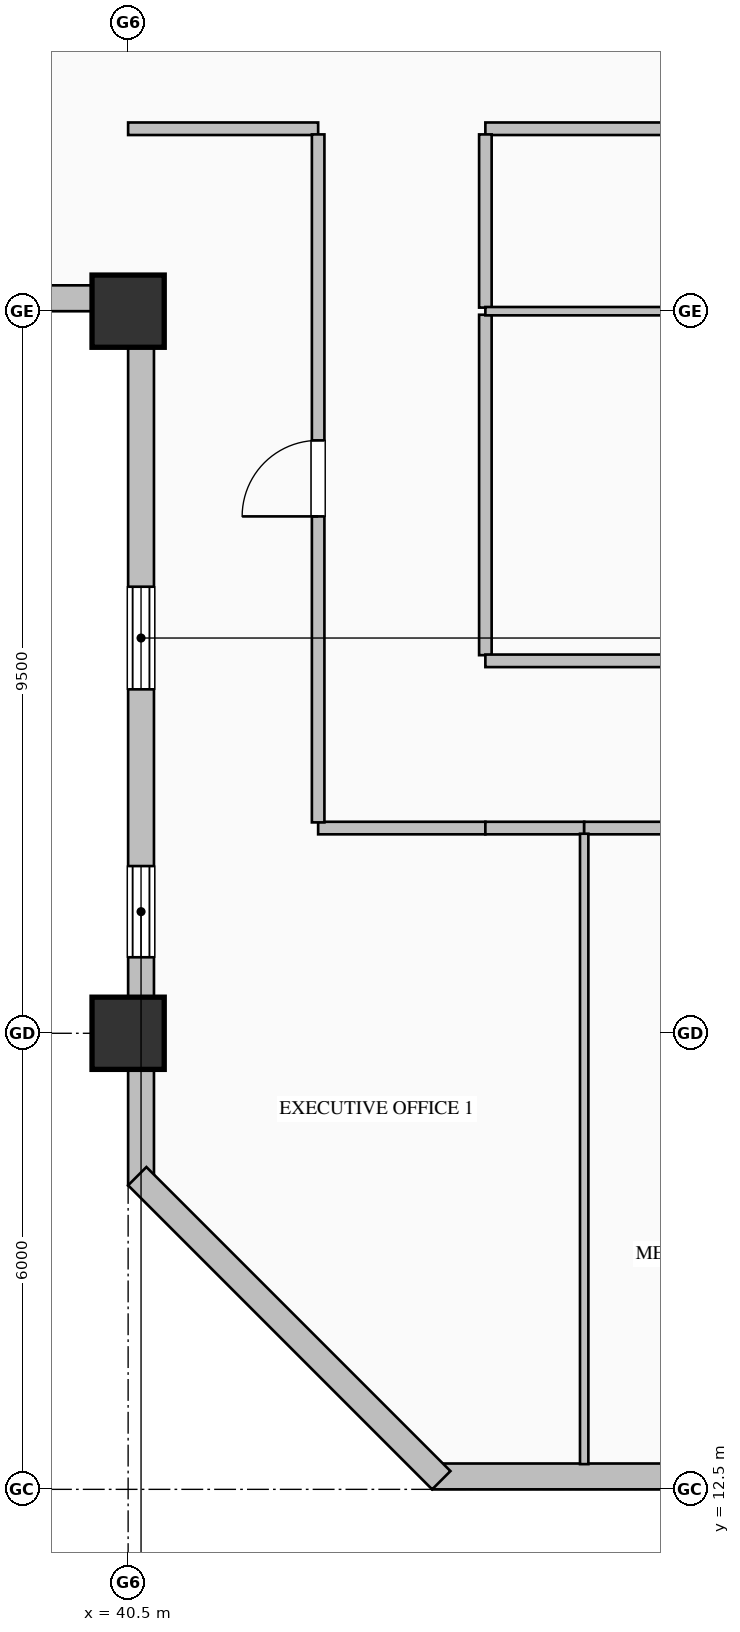
"""IFC4 building model, lengths in metres.
Left out: names, types, materials, properties, quantities, classifications, styles, units other than length and angle.
Written with IfcOpenShell. Run it as: python <this file> out.ifc"""

import sys

from ifc_helpers import new_model, si_unit, direction, frame, frame_2d, origin, origin_2d, place, context, subcontext, project, spatial, rectangle, hollow_rectangle, extrude, element, fill, save


model = new_model("IFC4")
c1 = context("Model", 3, precision=1e-05, world=origin(), true_north=direction((0.0, 1.0)))
c2 = subcontext(c1, "Body", "Model", "MODEL_VIEW")
j1 = project(units=[si_unit("LENGTHUNIT", "METRE"), si_unit("PLANEANGLEUNIT", "RADIAN")], contexts=[c1])
p1 = place(None, origin())
s1 = spatial("IfcSite", under=j1, at=p1, CompositionType="ELEMENT")
p2 = place(p1, origin())
s2 = spatial("IfcBuilding", under=s1, at=p2, CompositionType="ELEMENT")
p3 = place(p2, frame((0.0, 0.0, 213.8)))
s3 = spatial("IfcBuildingStorey", under=s2, at=p3, CompositionType="ELEMENT", Elevation=213.8)
for number, where, z_axis, x_axis in (
    (1, (40.5, 18.5, 0.0), (0.0, 0.0, 1.0), (1.0, 0.0, 0.0)),
    (2, (40.5, 28.0, 0.0), (0.0, 0.0, 1.0), (1.0, 0.0, 0.0)),
):
    element("IfcColumn", number, at=place(p3, frame(where, z_axis=z_axis, x_axis=x_axis)), inside=s3, PredefinedType="COLUMN", context=c2, shape_type="SweptSolid", body=[
        extrude(hollow_rectangle(XDim=0.95, YDim=0.95, WallThickness=0.036, at=origin_2d()), origin(), (0.0, 0.0, 1.0), 4.0),
    ])
p4 = place(p3, frame((40.67, 16.5, 0.0), z_axis=(0.0, 0.0, 1.0), x_axis=(0.0, 1.0, 0.0)))
e3 = element("IfcWall", 3, at=p4, inside=s3, PredefinedType="SOLIDWALL", context=c2, shape_type="SweptSolid", body=[
    extrude(rectangle(XDim=11.84, YDim=0.34, at=frame_2d((5.92, 0.0))), origin(), (0.0, 0.0, 1.0), 3.187),
])
p5 = place(p4, frame((3.0, 0.0, 0.9)))
e4 = element("IfcOpeningElement", 4, at=p5, cuts=e3, PredefinedType="OPENING", context=c2, shape_type="SweptSolid", body=[
    extrude(rectangle(XDim=1.2, YDim=1.85, at=frame_2d((0.6, 0.925))), frame((0.0, 0.18, 0.0), z_axis=(0.0, -1.0, 0.0), x_axis=(1.0, 0.0, 0.0)), (0.0, 0.0, 1.0), 0.36),
])
p6 = place(p4, frame((6.525, 0.0, 0.9)))
e5 = element("IfcOpeningElement", 5, at=p6, cuts=e3, PredefinedType="OPENING", context=c2, shape_type="SweptSolid", body=[
    extrude(rectangle(XDim=1.35, YDim=1.85, at=frame_2d((0.675, 0.925))), frame((0.0, 0.18, 0.0), z_axis=(0.0, -1.0, 0.0), x_axis=(1.0, 0.0, 0.0)), (0.0, 0.0, 1.0), 0.36),
])
p7 = place(p3, frame((40.52, 28.17, 0.0), z_axis=(0.0, 0.0, 1.0), x_axis=(-1.0, 0.0, 0.0)))
e6 = element("IfcWall", 6, at=p7, inside=s3, PredefinedType="SOLIDWALL", context=c2, shape_type="SweptSolid", body=[
    extrude(rectangle(XDim=27.52, YDim=0.34, at=frame_2d((13.76, 0.0))), origin(), (0.0, 0.0, 1.0), 3.187),
])
p8 = place(p7, frame((10.2, 0.0, 0.9)))
e7 = element("IfcOpeningElement", 7, at=p8, cuts=e6, PredefinedType="OPENING", context=c2, shape_type="SweptSolid", body=[
    extrude(rectangle(XDim=1.2, YDim=1.85, at=frame_2d((0.6, 0.925))), frame((0.0, 0.18, 0.0), z_axis=(0.0, -1.0, 0.0), x_axis=(1.0, 0.0, 0.0)), (0.0, 0.0, 1.0), 0.36),
])
p9 = place(p7, frame((13.725, 0.0, 0.9)))
e8 = element("IfcOpeningElement", 8, at=p9, cuts=e6, PredefinedType="OPENING", context=c2, shape_type="SweptSolid", body=[
    extrude(rectangle(XDim=1.35, YDim=1.85, at=frame_2d((0.675, 0.925))), frame((0.0, 0.18, 0.0), z_axis=(0.0, -1.0, 0.0), x_axis=(1.0, 0.0, 0.0)), (0.0, 0.0, 1.0), 0.36),
])
p10 = place(p7, frame((17.4, 0.0, 0.7)))
e9 = element("IfcOpeningElement", 9, at=p10, cuts=e6, PredefinedType="OPENING", context=c2, shape_type="SweptSolid", body=[
    extrude(rectangle(XDim=1.2, YDim=1.85, at=frame_2d((0.6, 0.925))), frame((0.0, 0.18, 0.0), z_axis=(0.0, -1.0, 0.0), x_axis=(1.0, 0.0, 0.0)), (0.0, 0.0, 1.0), 0.36),
])
p11 = place(p7, frame((21.0, 0.0, 0.9)))
e10 = element("IfcOpeningElement", 10, at=p11, cuts=e6, PredefinedType="OPENING", context=c2, shape_type="SweptSolid", body=[
    extrude(rectangle(XDim=1.2, YDim=1.85, at=frame_2d((0.6, 0.925))), frame((0.0, 0.18, 0.0), z_axis=(0.0, -1.0, 0.0), x_axis=(1.0, 0.0, 0.0)), (0.0, 0.0, 1.0), 0.36),
])
p12 = place(p3, frame((60.0, 12.67, 0.0), z_axis=(0.0, 0.0, 1.0), x_axis=(-1.0, 0.0, 0.0)))
e11 = element("IfcWall", 11, at=p12, inside=s3, PredefinedType="SOLIDWALL", context=c2, shape_type="SweptSolid", body=[
    extrude(rectangle(XDim=15.5, YDim=0.34, at=frame_2d((7.75, 0.0))), origin(), (0.0, 0.0, 1.0), 3.325),
])
p13 = place(p3, frame((44.62, 12.62, 0.0), z_axis=(0.0, 0.0, 1.0), x_axis=(-0.707106781187, 0.707106781187, 0.0)))
e12 = element("IfcWall", 12, at=p13, inside=s3, PredefinedType="SOLIDWALL", context=c2, shape_type="SweptSolid", body=[
    extrude(rectangle(XDim=5.657, YDim=0.34, at=frame_2d((2.828, 0.0))), origin(), (0.0, 0.0, 1.0), 3.775),
])
p14 = place(p3, frame((56.5, 30.4, 0.0), z_axis=(0.0, 0.0, 1.0), x_axis=(-1.0, 0.0, 0.0)))
e13 = element("IfcWall", 13, at=p14, inside=s3, PredefinedType="PARTITIONING", context=c2, shape_type="SweptSolid", body=[
    extrude(rectangle(XDim=11.3, YDim=0.165, at=frame_2d((5.65, 0.0))), origin(), (0.0, 0.0, 1.0), 3.775),
])
p15 = place(p14, frame((5.1, 0.0, 0.0)))
e14 = element("IfcOpeningElement", 14, at=p15, cuts=e13, PredefinedType="OPENING", context=c2, shape_type="SweptSolid", body=[
    extrude(rectangle(XDim=1.1, YDim=2.2, at=frame_2d((0.55, 1.1))), frame((0.0, 0.093, 0.0), z_axis=(0.0, -1.0, 0.0), x_axis=(1.0, 0.0, 0.0)), (0.0, 0.0, 1.0), 0.185),
])
p16 = place(p3, frame((43.0, 30.4, 0.0), z_axis=(0.0, 0.0, 1.0), x_axis=(-1.0, 0.0, 0.0)))
e15 = element("IfcWall", 15, at=p16, inside=s3, PredefinedType="PARTITIONING", context=c2, shape_type="SweptSolid", body=[
    extrude(rectangle(XDim=2.5, YDim=0.165, at=frame_2d((1.25, 0.0))), origin(), (0.0, 0.0, 1.0), 3.775),
])
p17 = place(p3, frame((45.2, 27.953, 0.0), z_axis=(0.0, 0.0, 1.0), x_axis=(0.0, -1.0, 0.0)))
e16 = element("IfcWall", 16, at=p17, inside=s3, PredefinedType="PARTITIONING", context=c2, shape_type="SweptSolid", body=[
    extrude(rectangle(XDim=4.478, YDim=0.165, at=frame_2d((2.239, 0.0))), origin(), (0.0, 0.0, 1.0), 3.775),
])
p18 = place(p3, frame((45.2, 30.325, 0.0), z_axis=(0.0, 0.0, 1.0), x_axis=(0.0, -1.0, 0.0)))
e17 = element("IfcWall", 17, at=p18, inside=s3, PredefinedType="PARTITIONING", context=c2, shape_type="SweptSolid", body=[
    extrude(rectangle(XDim=2.278, YDim=0.165, at=frame_2d((1.139, 0.0))), origin(), (0.0, 0.0, 1.0), 3.775),
])
p19 = place(p3, frame((45.2, 21.2, 0.0), z_axis=(0.0, 0.0, 1.0), x_axis=(-1.0, 0.0, 0.0)))
e18 = element("IfcWall", 18, at=p19, inside=s3, PredefinedType="PARTITIONING", context=c2, shape_type="SweptSolid", body=[
    extrude(rectangle(XDim=2.2, YDim=0.165, at=frame_2d((1.1, 0.0))), origin(), (0.0, 0.0, 1.0), 3.775),
])
p20 = place(p3, frame((43.0, 21.274, 0.0), z_axis=(0.0, 0.0, 1.0), x_axis=(0.0, 1.0, 0.0)))
e19 = element("IfcWall", 19, at=p20, inside=s3, PredefinedType="PARTITIONING", context=c2, shape_type="SweptSolid", body=[
    extrude(rectangle(XDim=9.051, YDim=0.165, at=frame_2d((4.525, 0.0))), origin(), (0.0, 0.0, 1.0), 3.775),
])
p21 = place(p20, frame((4.025, 0.0, 0.0)))
e20 = element("IfcOpeningElement", 20, at=p21, cuts=e19, PredefinedType="OPENING", context=c2, shape_type="SweptSolid", body=[
    extrude(rectangle(XDim=1.0, YDim=2.15, at=frame_2d((0.5, 1.075))), frame((0.0, 0.093, 0.0), z_axis=(0.0, -1.0, 0.0), x_axis=(1.0, 0.0, 0.0)), (0.0, 0.0, 1.0), 0.185),
])
p22 = place(p3, frame((45.2, 23.4, 0.0), z_axis=(0.0, 0.0, 1.0), x_axis=(1.0, 0.0, 0.0)))
e21 = element("IfcWall", 21, at=p22, inside=s3, PredefinedType="PARTITIONING", context=c2, shape_type="SweptSolid", body=[
    extrude(rectangle(XDim=12.8, YDim=0.165, at=frame_2d((6.4, 0.0))), origin(), (0.0, 0.0, 1.0), 3.467),
])
p23 = place(p22, frame((5.9, 0.0, 0.0)))
e22 = element("IfcOpeningElement", 22, at=p23, cuts=e21, PredefinedType="OPENING", context=c2, shape_type="SweptSolid", body=[
    extrude(rectangle(XDim=1.0, YDim=2.15, at=frame_2d((0.5, 1.075))), frame((0.0, 0.093, 0.0), z_axis=(0.0, -1.0, 0.0), x_axis=(1.0, 0.0, 0.0)), (0.0, 0.0, 1.0), 0.185),
])
p24 = place(p3, frame((46.5, 21.2, 0.0), z_axis=(0.0, 0.0, 1.0), x_axis=(-1.0, 0.0, 0.0)))
e23 = element("IfcWall", 23, at=p24, inside=s3, PredefinedType="PARTITIONING", context=c2, shape_type="SweptSolid", body=[
    extrude(rectangle(XDim=1.3, YDim=0.165, at=frame_2d((0.65, 0.0))), origin(), (0.0, 0.0, 1.0), 3.775),
])
p25 = place(p3, frame((50.0, 21.2, 0.0), z_axis=(0.0, 0.0, 1.0), x_axis=(-1.0, 0.0, 0.0)))
e24 = element("IfcWall", 24, at=p25, inside=s3, PredefinedType="PARTITIONING", context=c2, shape_type="SweptSolid", body=[
    extrude(rectangle(XDim=3.5, YDim=0.165, at=frame_2d((1.75, 0.0))), origin(), (0.0, 0.0, 1.0), 3.775),
])
p26 = place(p25, frame((1.2, 0.0, 0.0)))
e25 = element("IfcOpeningElement", 25, at=p26, cuts=e24, PredefinedType="OPENING", context=c2, shape_type="SweptSolid", body=[
    extrude(rectangle(XDim=1.1, YDim=2.2, at=frame_2d((0.55, 1.1))), frame((0.0, 0.093, 0.0), z_axis=(0.0, -1.0, 0.0), x_axis=(1.0, 0.0, 0.0)), (0.0, 0.0, 1.0), 0.185),
])
p27 = place(p3, frame((45.2, 28.0, 0.0), z_axis=(0.0, 0.0, 1.0), x_axis=(1.0, 0.0, 0.0)))
e26 = element("IfcWall", 26, at=p27, inside=s3, PredefinedType="MOVABLE", context=c2, shape_type="SweptSolid", body=[
    extrude(rectangle(XDim=18.528, YDim=0.11, at=frame_2d((9.264, 0.0))), origin(), (0.0, 0.0, 1.0), 3.179),
])
p28 = place(p3, frame((46.5, 21.125, 0.0), z_axis=(0.0, 0.0, 1.0), x_axis=(0.0, -1.0, 0.0)))
e27 = element("IfcWall", 27, at=p28, inside=s3, PredefinedType="MOVABLE", context=c2, shape_type="SweptSolid", body=[
    extrude(rectangle(XDim=8.293, YDim=0.11, at=frame_2d((4.147, 0.0))), origin(), (0.0, 0.0, 1.0), 3.775),
])
p29 = place(p5, origin())
e28 = element("IfcWindow", 28, at=p29, inside=s3, PartitioningType="DOUBLE_PANEL_VERTICAL", PredefinedType="WINDOW", context=c2, shape_type="SweptSolid", body=[
    extrude(rectangle(XDim=1.2, YDim=1.85, at=frame_2d((0.6, 0.925))), frame((0.0, 0.15, 0.0), z_axis=(0.0, -1.0, 0.0), x_axis=(1.0, 0.0, 0.0)), (0.0, 0.0, 1.0), 0.06),
])
fill(e4, e28)
p30 = place(p6, origin())
e29 = element("IfcWindow", 29, at=p30, inside=s3, PartitioningType="DOUBLE_PANEL_VERTICAL", PredefinedType="WINDOW", context=c2, shape_type="SweptSolid", body=[
    extrude(rectangle(XDim=1.35, YDim=1.85, at=frame_2d((0.675, 0.925))), frame((0.0, 0.15, 0.0), z_axis=(0.0, -1.0, 0.0), x_axis=(1.0, 0.0, 0.0)), (0.0, 0.0, 1.0), 0.06),
])
fill(e5, e29)
p31 = place(p21, origin())
e30 = element("IfcDoor", 30, at=p31, inside=s3, OperationType="SINGLE_SWING_LEFT", PredefinedType="DOOR", context=c2, shape_type="SweptSolid", body=[
    extrude(rectangle(XDim=1.0, YDim=2.15, at=frame_2d((0.5, 1.075))), frame((0.0, 0.025, 0.0), z_axis=(0.0, -1.0, 0.0), x_axis=(1.0, 0.0, 0.0)), (0.0, 0.0, 1.0), 0.05),
])
fill(e20, e30)
save(model, sys.argv[1])
